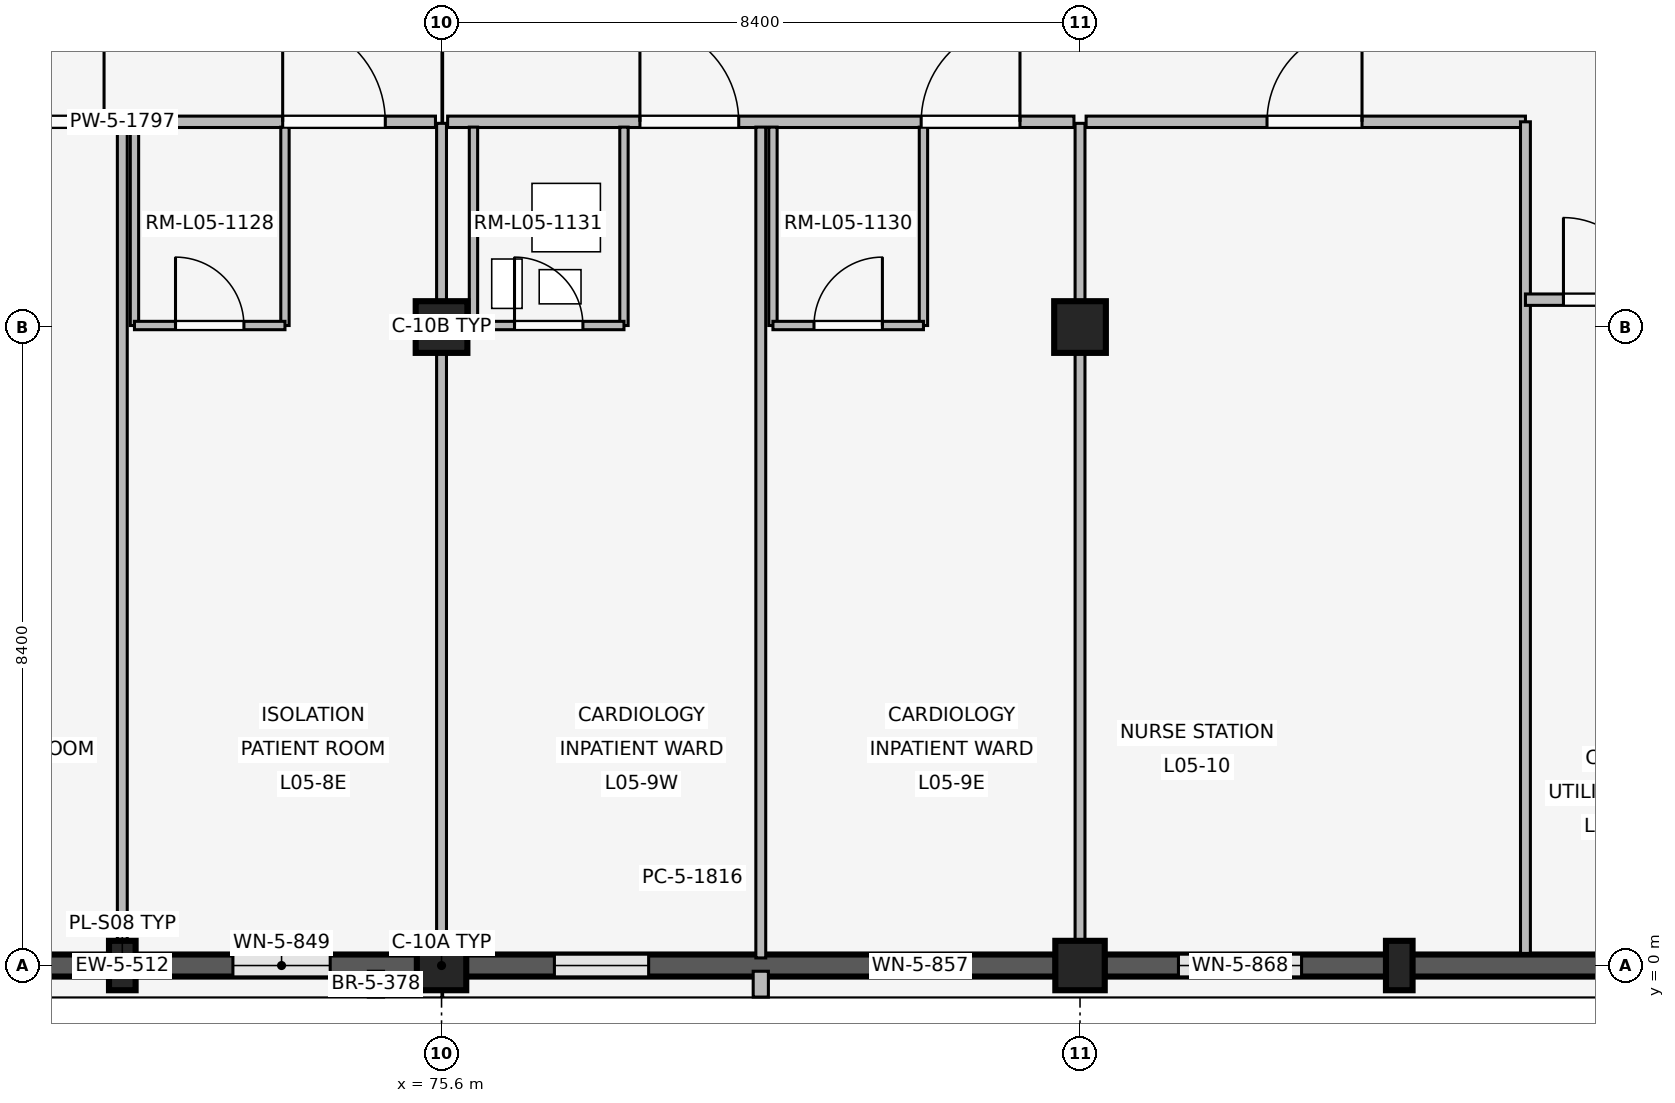
"""IFC4 building model, lengths in metres.
Left out: names, types, materials, properties, quantities, classifications, styles, units other than length and angle.
Written with IfcOpenShell. Run it as: python <this file> out.ifc"""

import sys

from ifc_helpers import new_model, si_unit, direction, frame, frame_2d, origin, origin_2d, place, context, subcontext, project, spatial, rectangle, extrude, element, fill, save


model = new_model("IFC4")
c1 = context("Model", 3, precision=1e-05, world=origin(), true_north=direction((0.0, 1.0)))
c2 = subcontext(c1, "Body", "Model", "MODEL_VIEW")
j1 = project(units=[si_unit("LENGTHUNIT", "METRE"), si_unit("PLANEANGLEUNIT", "RADIAN")], contexts=[c1])
p1 = place(None, origin())
s1 = spatial("IfcSite", under=j1, at=p1, CompositionType="ELEMENT")
p2 = place(p1, origin())
s2 = spatial("IfcBuilding", under=s1, at=p2, CompositionType="ELEMENT")
p3 = place(p2, frame((0.0, 0.0, 20.4)))
s3 = spatial("IfcBuildingStorey", under=s2, at=p3, CompositionType="ELEMENT", Elevation=20.4)
p4 = place(p3, frame((75.6, 0.0, 0.0), z_axis=(0.0, 0.0, 1.0), x_axis=(1.0, 0.0, 0.0)))
e1 = element("IfcColumn", 1, at=p4, inside=s3, PredefinedType="COLUMN", context=c2, shape_type="SweptSolid", body=[
    extrude(rectangle(XDim=0.65, YDim=0.65, at=origin_2d()), origin(), (0.0, 0.0, 1.0), 4.2),
])
p5 = place(p3, frame((75.6, 8.4, 0.0), z_axis=(0.0, 0.0, 1.0), x_axis=(1.0, 0.0, 0.0)))
e2 = element("IfcColumn", 2, at=p5, inside=s3, PredefinedType="COLUMN", context=c2, shape_type="SweptSolid", body=[
    extrude(rectangle(XDim=0.68, YDim=0.68, at=origin_2d()), origin(), (0.0, 0.0, 1.0), 4.2),
])
p6 = place(p3, frame((84.0, 0.0, 0.0), z_axis=(0.0, 0.0, 1.0), x_axis=(1.0, 0.0, 0.0)))
e3 = element("IfcColumn", 3, at=p6, inside=s3, PredefinedType="COLUMN", context=c2, shape_type="SweptSolid", body=[
    extrude(rectangle(XDim=0.65, YDim=0.65, at=origin_2d()), origin(), (0.0, 0.0, 1.0), 4.2),
])
p7 = place(p3, frame((84.0, 8.4, 0.0), z_axis=(0.0, 0.0, 1.0), x_axis=(1.0, 0.0, 0.0)))
e4 = element("IfcColumn", 4, at=p7, inside=s3, PredefinedType="COLUMN", context=c2, shape_type="SweptSolid", body=[
    extrude(rectangle(XDim=0.68, YDim=0.68, at=origin_2d()), origin(), (0.0, 0.0, 1.0), 4.2),
])
for number, where, z_axis, x_axis in (
    (5, (71.4, 0.0, 0.0), (0.0, 0.0, 1.0), (1.0, 0.0, 0.0)),
    (6, (88.2, 0.0, 0.0), (0.0, 0.0, 1.0), (1.0, 0.0, 0.0)),
):
    element("IfcColumn", number, at=place(p3, frame(where, z_axis=z_axis, x_axis=x_axis)), inside=s3, PredefinedType="PILASTER", context=c2, shape_type="SweptSolid", body=[
        extrude(rectangle(XDim=0.35, YDim=0.65, at=origin_2d()), origin(), (0.0, 0.0, 1.0), 4.2),
    ])
p8 = place(p3, frame((75.28, 0.0, 0.0), z_axis=(0.0, 0.0, 1.0), x_axis=(-1.0, 0.0, 0.0)))
e7 = element("IfcWall", 7, at=p8, inside=s3, PredefinedType="SOLIDWALL", context=c2, shape_type="SweptSolid", body=[
    extrude(rectangle(XDim=7.76, YDim=0.29, at=frame_2d((3.88, 0.0))), origin(), (0.0, 0.0, 1.0), 3.34),
])
p9 = place(p8, frame((1.145, 0.0, 0.85)))
e8 = element("IfcOpeningElement", 8, at=p9, cuts=e7, PredefinedType="OPENING", context=c2, shape_type="SweptSolid", body=[
    extrude(rectangle(XDim=1.28, YDim=1.38, at=frame_2d((0.64, 0.69))), frame((0.0, 0.155, 0.0), z_axis=(0.0, -1.0, 0.0), x_axis=(1.0, 0.0, 0.0)), (0.0, 0.0, 1.0), 0.31),
])
p10 = place(p8, frame((5.335, 0.0, 0.85)))
e9 = element("IfcOpeningElement", 9, at=p10, cuts=e7, PredefinedType="OPENING", context=c2, shape_type="SweptSolid", body=[
    extrude(rectangle(XDim=1.28, YDim=1.38, at=frame_2d((0.64, 0.69))), frame((0.0, 0.155, 0.0), z_axis=(0.0, -1.0, 0.0), x_axis=(1.0, 0.0, 0.0)), (0.0, 0.0, 1.0), 0.31),
])
p11 = place(p3, frame((74.737, -0.075, 0.0), z_axis=(0.0, 0.0, 1.0), x_axis=(0.0, -1.0, 0.0)))
e10 = element("IfcWall", 10, at=p11, inside=s3, PredefinedType="ELEMENTEDWALL", context=c2, shape_type="SweptSolid", body=[
    extrude(rectangle(XDim=0.34, YDim=0.2, at=frame_2d((0.17, 0.0))), origin(), (0.0, 0.0, 1.0), 3.32),
])
p12 = place(p3, frame((83.68, 0.0, 0.0), z_axis=(0.0, 0.0, 1.0), x_axis=(-1.0, 0.0, 0.0)))
e11 = element("IfcWall", 11, at=p12, inside=s3, PredefinedType="SOLIDWALL", context=c2, shape_type="SweptSolid", body=[
    extrude(rectangle(XDim=7.76, YDim=0.29, at=frame_2d((3.88, 0.0))), origin(), (0.0, 0.0, 1.0), 3.34),
])
p13 = place(p12, frame((1.165, 0.0, 0.85)))
e12 = element("IfcOpeningElement", 12, at=p13, cuts=e11, PredefinedType="OPENING", context=c2, shape_type="SweptSolid", body=[
    extrude(rectangle(XDim=1.24, YDim=1.34, at=frame_2d((0.62, 0.67))), frame((0.0, 0.155, 0.0), z_axis=(0.0, -1.0, 0.0), x_axis=(1.0, 0.0, 0.0)), (0.0, 0.0, 1.0), 0.31),
])
p14 = place(p12, frame((5.355, 0.0, 0.85)))
e13 = element("IfcOpeningElement", 13, at=p14, cuts=e11, PredefinedType="OPENING", context=c2, shape_type="SweptSolid", body=[
    extrude(rectangle(XDim=1.24, YDim=1.34, at=frame_2d((0.62, 0.67))), frame((0.0, 0.155, 0.0), z_axis=(0.0, -1.0, 0.0), x_axis=(1.0, 0.0, 0.0)), (0.0, 0.0, 1.0), 0.31),
])
p15 = place(p3, frame((79.8, -0.075, 0.0), z_axis=(0.0, 0.0, 1.0), x_axis=(0.0, -1.0, 0.0)))
e14 = element("IfcWall", 14, at=p15, inside=s3, PredefinedType="ELEMENTEDWALL", context=c2, shape_type="SweptSolid", body=[
    extrude(rectangle(XDim=0.34, YDim=0.2, at=frame_2d((0.17, 0.0))), origin(), (0.0, 0.0, 1.0), 3.32),
])
p16 = place(p3, frame((92.08, 0.0, 0.0), z_axis=(0.0, 0.0, 1.0), x_axis=(-1.0, 0.0, 0.0)))
e15 = element("IfcWall", 15, at=p16, inside=s3, PredefinedType="SOLIDWALL", context=c2, shape_type="SweptSolid", body=[
    extrude(rectangle(XDim=7.76, YDim=0.29, at=frame_2d((3.88, 0.0))), origin(), (0.0, 0.0, 1.0), 3.34),
])
p17 = place(p16, frame((5.165, 0.0, 0.85)))
e16 = element("IfcOpeningElement", 16, at=p17, cuts=e15, PredefinedType="OPENING", context=c2, shape_type="SweptSolid", body=[
    extrude(rectangle(XDim=1.62, YDim=1.52, at=frame_2d((0.81, 0.76))), frame((0.0, 0.155, 0.0), z_axis=(0.0, -1.0, 0.0), x_axis=(1.0, 0.0, 0.0)), (0.0, 0.0, 1.0), 0.31),
])
p18 = place(p3, frame((67.28, 11.1, 0.0), z_axis=(0.0, 0.0, 1.0), x_axis=(1.0, 0.0, 0.0)))
e17 = element("IfcWall", 17, at=p18, inside=s3, PredefinedType="PARTITIONING", context=c2, shape_type="SweptSolid", body=[
    extrude(rectangle(XDim=8.24, YDim=0.15, at=frame_2d((4.12, 0.0))), origin(), (0.0, 0.0, 1.0), 3.32),
])
p19 = place(p18, frame((2.53, 0.0, 0.0)))
e18 = element("IfcOpeningElement", 18, at=p19, cuts=e17, PredefinedType="OPENING", context=c2, shape_type="SweptSolid", body=[
    extrude(rectangle(XDim=1.35, YDim=2.25, at=frame_2d((0.675, 1.125))), frame((0.0, 0.085, 0.0), z_axis=(0.0, -1.0, 0.0), x_axis=(1.0, 0.0, 0.0)), (0.0, 0.0, 1.0), 0.17),
])
p20 = place(p18, frame((6.23, 0.0, 0.0)))
e19 = element("IfcOpeningElement", 19, at=p20, cuts=e17, PredefinedType="OPENING", context=c2, shape_type="SweptSolid", body=[
    extrude(rectangle(XDim=1.35, YDim=2.25, at=frame_2d((0.675, 1.125))), frame((0.0, 0.085, 0.0), z_axis=(0.0, -1.0, 0.0), x_axis=(1.0, 0.0, 0.0)), (0.0, 0.0, 1.0), 0.17),
])
p21 = place(p3, frame((71.4, 0.1, 0.0), z_axis=(0.0, 0.0, 1.0), x_axis=(0.0, 1.0, 0.0)))
e20 = element("IfcWall", 20, at=p21, inside=s3, PredefinedType="PARTITIONING", context=c2, shape_type="SweptSolid", body=[
    extrude(rectangle(XDim=10.93, YDim=0.13, at=frame_2d((5.465, 0.0))), origin(), (0.0, 0.0, 1.0), 3.32),
])
for number, where, z_axis, x_axis in (
    (21, (71.56, 8.42, 0.0), (0.0, 0.0, 1.0), (0.0, 1.0, 0.0)),
    (22, (73.54, 8.42, 0.0), (0.0, 0.0, 1.0), (0.0, 1.0, 0.0)),
):
    element("IfcWall", number, at=place(p3, frame(where, z_axis=z_axis, x_axis=x_axis)), inside=s3, PredefinedType="PARTITIONING", context=c2, shape_type="SweptSolid", body=[
        extrude(rectangle(XDim=2.61, YDim=0.11, at=frame_2d((1.305, 0.0))), origin(), (0.0, 0.0, 1.0), 3.32),
    ])
p22 = place(p3, frame((71.56, 8.42, 0.0), z_axis=(0.0, 0.0, 1.0), x_axis=(1.0, 0.0, 0.0)))
e23 = element("IfcWall", 23, at=p22, inside=s3, PredefinedType="PARTITIONING", context=c2, shape_type="SweptSolid", body=[
    extrude(rectangle(XDim=1.98, YDim=0.11, at=frame_2d((0.99, 0.0))), origin(), (0.0, 0.0, 1.0), 3.32),
])
p23 = place(p22, frame((0.54, 0.0, 0.0)))
e24 = element("IfcOpeningElement", 24, at=p23, cuts=e23, PredefinedType="OPENING", context=c2, shape_type="SweptSolid", body=[
    extrude(rectangle(XDim=0.9, YDim=2.1, at=frame_2d((0.45, 1.05))), frame((0.0, 0.065, 0.0), z_axis=(0.0, -1.0, 0.0), x_axis=(1.0, 0.0, 0.0)), (0.0, 0.0, 1.0), 0.13),
])
p24 = place(p3, frame((75.6, 0.14, 0.0), z_axis=(0.0, 0.0, 1.0), x_axis=(0.0, 1.0, 0.0)))
e25 = element("IfcWall", 25, at=p24, inside=s3, PredefinedType="PARTITIONING", context=c2, shape_type="SweptSolid", body=[
    extrude(rectangle(XDim=10.94, YDim=0.13, at=frame_2d((5.47, 0.0))), origin(), (0.0, 0.0, 1.0), 3.32),
])
p25 = place(p3, frame((75.68, 11.1, 0.0), z_axis=(0.0, 0.0, 1.0), x_axis=(1.0, 0.0, 0.0)))
e26 = element("IfcWall", 26, at=p25, inside=s3, PredefinedType="PARTITIONING", context=c2, shape_type="SweptSolid", body=[
    extrude(rectangle(XDim=8.24, YDim=0.15, at=frame_2d((4.12, 0.0))), origin(), (0.0, 0.0, 1.0), 3.32),
])
p26 = place(p25, frame((2.53, 0.0, 0.0)))
e27 = element("IfcOpeningElement", 27, at=p26, cuts=e26, PredefinedType="OPENING", context=c2, shape_type="SweptSolid", body=[
    extrude(rectangle(XDim=1.3, YDim=2.25, at=frame_2d((0.65, 1.125))), frame((0.0, 0.085, 0.0), z_axis=(0.0, -1.0, 0.0), x_axis=(1.0, 0.0, 0.0)), (0.0, 0.0, 1.0), 0.17),
])
p27 = place(p25, frame((6.23, 0.0, 0.0)))
e28 = element("IfcOpeningElement", 28, at=p27, cuts=e26, PredefinedType="OPENING", context=c2, shape_type="SweptSolid", body=[
    extrude(rectangle(XDim=1.3, YDim=2.25, at=frame_2d((0.65, 1.125))), frame((0.0, 0.085, 0.0), z_axis=(0.0, -1.0, 0.0), x_axis=(1.0, 0.0, 0.0)), (0.0, 0.0, 1.0), 0.17),
])
p28 = place(p3, frame((79.8, 0.1, 0.0), z_axis=(0.0, 0.0, 1.0), x_axis=(0.0, 1.0, 0.0)))
e29 = element("IfcWall", 29, at=p28, inside=s3, PredefinedType="PARTITIONING", context=c2, shape_type="SweptSolid", body=[
    extrude(rectangle(XDim=10.93, YDim=0.13, at=frame_2d((5.465, 0.0))), origin(), (0.0, 0.0, 1.0), 3.32),
])
for number, where, z_axis, x_axis in (
    (30, (76.02, 8.42, 0.0), (0.0, 0.0, 1.0), (0.0, 1.0, 0.0)),
    (31, (78.0, 8.42, 0.0), (0.0, 0.0, 1.0), (0.0, 1.0, 0.0)),
):
    element("IfcWall", number, at=place(p3, frame(where, z_axis=z_axis, x_axis=x_axis)), inside=s3, PredefinedType="PARTITIONING", context=c2, shape_type="SweptSolid", body=[
        extrude(rectangle(XDim=2.61, YDim=0.11, at=frame_2d((1.305, 0.0))), origin(), (0.0, 0.0, 1.0), 3.32),
    ])
p29 = place(p3, frame((76.02, 8.42, 0.0), z_axis=(0.0, 0.0, 1.0), x_axis=(1.0, 0.0, 0.0)))
e32 = element("IfcWall", 32, at=p29, inside=s3, PredefinedType="PARTITIONING", context=c2, shape_type="SweptSolid", body=[
    extrude(rectangle(XDim=1.98, YDim=0.11, at=frame_2d((0.99, 0.0))), origin(), (0.0, 0.0, 1.0), 3.32),
])
p30 = place(p29, frame((0.54, 0.0, 0.0)))
e33 = element("IfcOpeningElement", 33, at=p30, cuts=e32, PredefinedType="OPENING", context=c2, shape_type="SweptSolid", body=[
    extrude(rectangle(XDim=0.9, YDim=2.1, at=frame_2d((0.45, 1.05))), frame((0.0, 0.065, 0.0), z_axis=(0.0, -1.0, 0.0), x_axis=(1.0, 0.0, 0.0)), (0.0, 0.0, 1.0), 0.13),
])
for number, where, z_axis, x_axis in (
    (34, (79.96, 8.42, 0.0), (0.0, 0.0, 1.0), (0.0, 1.0, 0.0)),
    (35, (81.94, 8.42, 0.0), (0.0, 0.0, 1.0), (0.0, 1.0, 0.0)),
):
    element("IfcWall", number, at=place(p3, frame(where, z_axis=z_axis, x_axis=x_axis)), inside=s3, PredefinedType="PARTITIONING", context=c2, shape_type="SweptSolid", body=[
        extrude(rectangle(XDim=2.61, YDim=0.11, at=frame_2d((1.305, 0.0))), origin(), (0.0, 0.0, 1.0), 3.32),
    ])
p31 = place(p3, frame((79.96, 8.42, 0.0), z_axis=(0.0, 0.0, 1.0), x_axis=(1.0, 0.0, 0.0)))
e36 = element("IfcWall", 36, at=p31, inside=s3, PredefinedType="PARTITIONING", context=c2, shape_type="SweptSolid", body=[
    extrude(rectangle(XDim=1.98, YDim=0.11, at=frame_2d((0.99, 0.0))), origin(), (0.0, 0.0, 1.0), 3.32),
])
p32 = place(p31, frame((0.54, 0.0, 0.0)))
e37 = element("IfcOpeningElement", 37, at=p32, cuts=e36, PredefinedType="OPENING", context=c2, shape_type="SweptSolid", body=[
    extrude(rectangle(XDim=0.9, YDim=2.1, at=frame_2d((0.45, 1.05))), frame((0.0, 0.065, 0.0), z_axis=(0.0, -1.0, 0.0), x_axis=(1.0, 0.0, 0.0)), (0.0, 0.0, 1.0), 0.13),
])
p33 = place(p3, frame((78.45, 1.15, 0.0), z_axis=(0.0, 0.0, 1.0), x_axis=(1.0, 0.0, 0.0)))
e38 = element("IfcWall", 38, at=p33, inside=s3, PredefinedType="PLUMBINGWALL", context=c2, shape_type="SweptSolid", body=[
    extrude(rectangle(XDim=0.9, YDim=0.24, at=frame_2d((0.45, 0.0))), origin(), (0.0, 0.0, 1.0), 3.32),
])
p34 = place(p3, frame((84.0, 0.14, 0.0), z_axis=(0.0, 0.0, 1.0), x_axis=(0.0, 1.0, 0.0)))
e39 = element("IfcWall", 39, at=p34, inside=s3, PredefinedType="PARTITIONING", context=c2, shape_type="SweptSolid", body=[
    extrude(rectangle(XDim=10.94, YDim=0.13, at=frame_2d((5.47, 0.0))), origin(), (0.0, 0.0, 1.0), 3.32),
])
p35 = place(p3, frame((84.08, 11.1, 0.0), z_axis=(0.0, 0.0, 1.0), x_axis=(1.0, 0.0, 0.0)))
e40 = element("IfcWall", 40, at=p35, inside=s3, PredefinedType="PARTITIONING", context=c2, shape_type="SweptSolid", body=[
    extrude(rectangle(XDim=5.78, YDim=0.15, at=frame_2d((2.89, 0.0))), origin(), (0.0, 0.0, 1.0), 3.32),
])
p36 = place(p35, frame((2.38, 0.0, 0.0)))
e41 = element("IfcOpeningElement", 41, at=p36, cuts=e40, PredefinedType="OPENING", context=c2, shape_type="SweptSolid", body=[
    extrude(rectangle(XDim=1.25, YDim=2.2, at=frame_2d((0.625, 1.1))), frame((0.0, 0.085, 0.0), z_axis=(0.0, -1.0, 0.0), x_axis=(1.0, 0.0, 0.0)), (0.0, 0.0, 1.0), 0.17),
])
p37 = place(p3, frame((89.86, 0.16, 0.0), z_axis=(0.0, 0.0, 1.0), x_axis=(0.0, 1.0, 0.0)))
e42 = element("IfcWall", 42, at=p37, inside=s3, PredefinedType="PARTITIONING", context=c2, shape_type="SweptSolid", body=[
    extrude(rectangle(XDim=10.94, YDim=0.13, at=frame_2d((5.47, 0.0))), origin(), (0.0, 0.0, 1.0), 3.32),
])
p38 = place(p3, frame((89.86, 8.76, 0.0), z_axis=(0.0, 0.0, 1.0), x_axis=(1.0, 0.0, 0.0)))
e43 = element("IfcWall", 43, at=p38, inside=s3, PredefinedType="PARTITIONING", context=c2, shape_type="SweptSolid", body=[
    extrude(rectangle(XDim=2.18, YDim=0.15, at=frame_2d((1.09, 0.0))), origin(), (0.0, 0.0, 1.0), 3.32),
])
p39 = place(p38, frame((0.5, 0.0, 0.0)))
e44 = element("IfcOpeningElement", 44, at=p39, cuts=e43, PredefinedType="OPENING", context=c2, shape_type="SweptSolid", body=[
    extrude(rectangle(XDim=1.08, YDim=2.15, at=frame_2d((0.54, 1.075))), frame((0.0, 0.085, 0.0), z_axis=(0.0, -1.0, 0.0), x_axis=(1.0, 0.0, 0.0)), (0.0, 0.0, 1.0), 0.17),
])
p40 = place(p9, origin())
e45 = element("IfcWindow", 45, at=p40, inside=s3, PartitioningType="SINGLE_PANEL", PredefinedType="WINDOW", context=c2, shape_type="SweptSolid", body=[
    extrude(rectangle(XDim=1.28, YDim=1.38, at=frame_2d((0.64, 0.69))), frame((0.0, 0.03, 0.0), z_axis=(0.0, -1.0, 0.0), x_axis=(1.0, 0.0, 0.0)), (0.0, 0.0, 1.0), 0.06),
])
fill(e8, e45)
p41 = place(p13, origin())
e46 = element("IfcWindow", 46, at=p41, inside=s3, PartitioningType="SINGLE_PANEL", PredefinedType="WINDOW", context=c2, shape_type="SweptSolid", body=[
    extrude(rectangle(XDim=1.24, YDim=1.34, at=frame_2d((0.62, 0.67))), frame((0.0, 0.03, 0.0), z_axis=(0.0, -1.0, 0.0), x_axis=(1.0, 0.0, 0.0)), (0.0, 0.0, 1.0), 0.06),
])
fill(e12, e46)
p42 = place(p14, origin())
e47 = element("IfcWindow", 47, at=p42, inside=s3, PartitioningType="SINGLE_PANEL", PredefinedType="WINDOW", context=c2, shape_type="SweptSolid", body=[
    extrude(rectangle(XDim=1.24, YDim=1.34, at=frame_2d((0.62, 0.67))), frame((0.0, 0.03, 0.0), z_axis=(0.0, -1.0, 0.0), x_axis=(1.0, 0.0, 0.0)), (0.0, 0.0, 1.0), 0.06),
])
fill(e13, e47)
p43 = place(p17, origin())
e48 = element("IfcWindow", 48, at=p43, inside=s3, PartitioningType="SINGLE_PANEL", PredefinedType="WINDOW", context=c2, shape_type="SweptSolid", body=[
    extrude(rectangle(XDim=1.62, YDim=1.52, at=frame_2d((0.81, 0.76))), frame((0.0, 0.03, 0.0), z_axis=(0.0, -1.0, 0.0), x_axis=(1.0, 0.0, 0.0)), (0.0, 0.0, 1.0), 0.06),
])
fill(e16, e48)
p44 = place(p19, origin())
e49 = element("IfcDoor", 49, at=p44, inside=s3, OperationType="SINGLE_SWING_RIGHT", PredefinedType="DOOR", context=c2, shape_type="SweptSolid", body=[
    extrude(rectangle(XDim=1.35, YDim=2.25, at=frame_2d((0.675, 1.125))), frame((0.0, 0.025, 0.0), z_axis=(0.0, -1.0, 0.0), x_axis=(1.0, 0.0, 0.0)), (0.0, 0.0, 1.0), 0.05),
])
fill(e18, e49)
p45 = place(p20, origin())
e50 = element("IfcDoor", 50, at=p45, inside=s3, OperationType="SINGLE_SWING_LEFT", PredefinedType="DOOR", context=c2, shape_type="SweptSolid", body=[
    extrude(rectangle(XDim=1.35, YDim=2.25, at=frame_2d((0.675, 1.125))), frame((0.0, 0.025, 0.0), z_axis=(0.0, -1.0, 0.0), x_axis=(1.0, 0.0, 0.0)), (0.0, 0.0, 1.0), 0.05),
])
fill(e19, e50)
p46 = place(p23, origin())
e51 = element("IfcDoor", 51, at=p46, inside=s3, OperationType="SINGLE_SWING_LEFT", PredefinedType="DOOR", context=c2, shape_type="SweptSolid", body=[
    extrude(rectangle(XDim=0.9, YDim=2.1, at=frame_2d((0.45, 1.05))), frame((0.0, 0.025, 0.0), z_axis=(0.0, -1.0, 0.0), x_axis=(1.0, 0.0, 0.0)), (0.0, 0.0, 1.0), 0.05),
])
fill(e24, e51)
p47 = place(p26, origin())
e52 = element("IfcDoor", 52, at=p47, inside=s3, OperationType="SINGLE_SWING_LEFT", PredefinedType="DOOR", context=c2, shape_type="SweptSolid", body=[
    extrude(rectangle(XDim=1.3, YDim=2.25, at=frame_2d((0.65, 1.125))), frame((0.0, 0.025, 0.0), z_axis=(0.0, -1.0, 0.0), x_axis=(1.0, 0.0, 0.0)), (0.0, 0.0, 1.0), 0.05),
])
fill(e27, e52)
p48 = place(p27, origin())
e53 = element("IfcDoor", 53, at=p48, inside=s3, OperationType="SINGLE_SWING_RIGHT", PredefinedType="DOOR", context=c2, shape_type="SweptSolid", body=[
    extrude(rectangle(XDim=1.3, YDim=2.25, at=frame_2d((0.65, 1.125))), frame((0.0, 0.025, 0.0), z_axis=(0.0, -1.0, 0.0), x_axis=(1.0, 0.0, 0.0)), (0.0, 0.0, 1.0), 0.05),
])
fill(e28, e53)
p49 = place(p30, origin())
e54 = element("IfcDoor", 54, at=p49, inside=s3, OperationType="SINGLE_SWING_LEFT", PredefinedType="DOOR", context=c2, shape_type="SweptSolid", body=[
    extrude(rectangle(XDim=0.9, YDim=2.1, at=frame_2d((0.45, 1.05))), frame((0.0, 0.025, 0.0), z_axis=(0.0, -1.0, 0.0), x_axis=(1.0, 0.0, 0.0)), (0.0, 0.0, 1.0), 0.05),
])
fill(e33, e54)
p50 = place(p32, origin())
e55 = element("IfcDoor", 55, at=p50, inside=s3, OperationType="SINGLE_SWING_RIGHT", PredefinedType="DOOR", context=c2, shape_type="SweptSolid", body=[
    extrude(rectangle(XDim=0.9, YDim=2.1, at=frame_2d((0.45, 1.05))), frame((0.0, 0.025, 0.0), z_axis=(0.0, -1.0, 0.0), x_axis=(1.0, 0.0, 0.0)), (0.0, 0.0, 1.0), 0.05),
])
fill(e37, e55)
p51 = place(p36, origin())
e56 = element("IfcDoor", 56, at=p51, inside=s3, OperationType="SINGLE_SWING_RIGHT", PredefinedType="DOOR", context=c2, shape_type="SweptSolid", body=[
    extrude(rectangle(XDim=1.25, YDim=2.2, at=frame_2d((0.625, 1.1))), frame((0.0, 0.025, 0.0), z_axis=(0.0, -1.0, 0.0), x_axis=(1.0, 0.0, 0.0)), (0.0, 0.0, 1.0), 0.05),
])
fill(e41, e56)
p52 = place(p39, origin())
e57 = element("IfcDoor", 57, at=p52, inside=s3, OperationType="SINGLE_SWING_LEFT", PredefinedType="DOOR", context=c2, shape_type="SweptSolid", body=[
    extrude(rectangle(XDim=1.08, YDim=2.15, at=frame_2d((0.54, 1.075))), frame((0.0, 0.025, 0.0), z_axis=(0.0, -1.0, 0.0), x_axis=(1.0, 0.0, 0.0)), (0.0, 0.0, 1.0), 0.05),
])
fill(e44, e57)
save(model, sys.argv[1])
